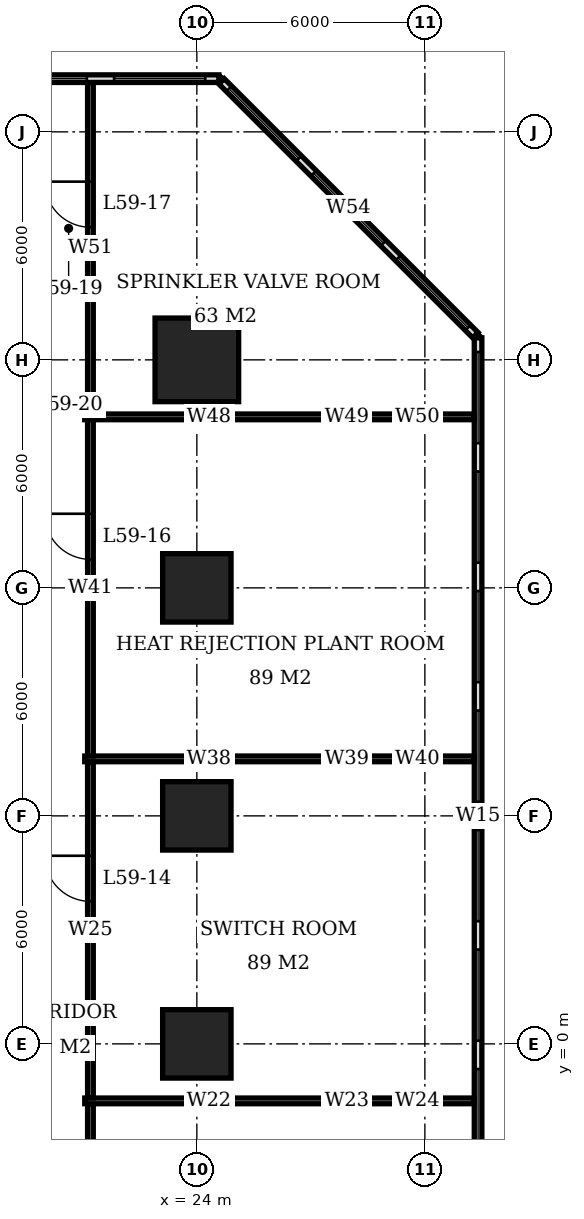
"""IFC4 building model, lengths in metres.
Left out: names, types, materials, properties, quantities, classifications, styles, units other than length and angle.
Written with IfcOpenShell. Run it as: python <this file> out.ifc"""

import sys

from ifc_helpers import new_model, si_unit, direction, frame, frame_2d, origin, origin_2d, place, context, subcontext, project, spatial, rectangle, extrude, element, fill, save


model = new_model("IFC4")
c1 = context("Model", 3, precision=1e-05, world=origin(), true_north=direction((0.0, 1.0)))
c2 = subcontext(c1, "Body", "Model", "MODEL_VIEW")
j1 = project(units=[si_unit("LENGTHUNIT", "METRE"), si_unit("PLANEANGLEUNIT", "RADIAN")], contexts=[c1])
p1 = place(None, origin())
s1 = spatial("IfcSite", under=j1, at=p1, CompositionType="ELEMENT")
p2 = place(p1, origin())
s2 = spatial("IfcBuilding", under=s1, at=p2, CompositionType="ELEMENT")
p3 = place(p2, frame((0.0, 0.0, 239.6)))
s3 = spatial("IfcBuildingStorey", under=s2, at=p3, CompositionType="ELEMENT", Elevation=239.6)
for number, where, z_axis, x_axis in (
    (1, (24.0, 0.0, 0.0), (0.0, 0.0, 1.0), (1.0, 0.0, 0.0)),
    (2, (24.0, 6.0, 0.0), (0.0, 0.0, 1.0), (1.0, 0.0, 0.0)),
    (3, (24.0, 12.0, 0.0), (0.0, 0.0, 1.0), (1.0, 0.0, 0.0)),
):
    element("IfcColumn", number, at=place(p3, frame(where, z_axis=z_axis, x_axis=x_axis)), inside=s3, PredefinedType="COLUMN", context=c2, shape_type="SweptSolid", body=[
        extrude(rectangle(XDim=1.8, YDim=1.8, at=origin_2d()), origin(), (0.0, 0.0, 1.0), 5.4),
    ])
p4 = place(p3, frame((24.0, 18.0, 0.0), z_axis=(0.0, 0.0, 1.0), x_axis=(1.0, 0.0, 0.0)))
e4 = element("IfcColumn", 4, at=p4, inside=s3, PredefinedType="COLUMN", context=c2, shape_type="SweptSolid", body=[
    extrude(rectangle(XDim=2.2, YDim=2.2, at=origin_2d()), origin(), (0.0, 0.0, 1.0), 5.4),
])
p5 = place(p3, frame((31.4, -6.58, 0.0), z_axis=(0.0, 0.0, 1.0), x_axis=(0.0, 1.0, 0.0)))
e5 = element("IfcWall", 5, at=p5, inside=s3, PredefinedType="USERDEFINED", context=c2, shape_type="SweptSolid", body=[
    extrude(rectangle(XDim=25.16, YDim=0.2, at=frame_2d((12.58, 0.0))), origin(), (0.0, 0.0, 1.0), 5.4),
])
p6 = place(p5, frame((0.373, 0.0, 0.6)))
e6 = element("IfcOpeningElement", 6, at=p6, cuts=e5, PredefinedType="OPENING", context=c2, shape_type="SweptSolid", body=[
    extrude(rectangle(XDim=2.4, YDim=3.0, at=frame_2d((1.2, 1.5))), frame((0.0, 0.11, 0.0), z_axis=(0.0, -1.0, 0.0), x_axis=(1.0, 0.0, 0.0)), (0.0, 0.0, 1.0), 0.22),
])
p7 = place(p5, frame((3.518, 0.0, 0.6)))
e7 = element("IfcOpeningElement", 7, at=p7, cuts=e5, PredefinedType="OPENING", context=c2, shape_type="SweptSolid", body=[
    extrude(rectangle(XDim=2.4, YDim=3.0, at=frame_2d((1.2, 1.5))), frame((0.0, 0.11, 0.0), z_axis=(0.0, -1.0, 0.0), x_axis=(1.0, 0.0, 0.0)), (0.0, 0.0, 1.0), 0.22),
])
p8 = place(p5, frame((6.662, 0.0, 0.6)))
e8 = element("IfcOpeningElement", 8, at=p8, cuts=e5, PredefinedType="OPENING", context=c2, shape_type="SweptSolid", body=[
    extrude(rectangle(XDim=2.4, YDim=3.0, at=frame_2d((1.2, 1.5))), frame((0.0, 0.11, 0.0), z_axis=(0.0, -1.0, 0.0), x_axis=(1.0, 0.0, 0.0)), (0.0, 0.0, 1.0), 0.22),
])
p9 = place(p5, frame((9.807, 0.0, 0.6)))
e9 = element("IfcOpeningElement", 9, at=p9, cuts=e5, PredefinedType="OPENING", context=c2, shape_type="SweptSolid", body=[
    extrude(rectangle(XDim=2.4, YDim=3.0, at=frame_2d((1.2, 1.5))), frame((0.0, 0.11, 0.0), z_axis=(0.0, -1.0, 0.0), x_axis=(1.0, 0.0, 0.0)), (0.0, 0.0, 1.0), 0.22),
])
p10 = place(p5, frame((12.952, 0.0, 0.6)))
e10 = element("IfcOpeningElement", 10, at=p10, cuts=e5, PredefinedType="OPENING", context=c2, shape_type="SweptSolid", body=[
    extrude(rectangle(XDim=2.4, YDim=3.0, at=frame_2d((1.2, 1.5))), frame((0.0, 0.11, 0.0), z_axis=(0.0, -1.0, 0.0), x_axis=(1.0, 0.0, 0.0)), (0.0, 0.0, 1.0), 0.22),
])
p11 = place(p5, frame((16.097, 0.0, 0.6)))
e11 = element("IfcOpeningElement", 11, at=p11, cuts=e5, PredefinedType="OPENING", context=c2, shape_type="SweptSolid", body=[
    extrude(rectangle(XDim=2.4, YDim=3.0, at=frame_2d((1.2, 1.5))), frame((0.0, 0.11, 0.0), z_axis=(0.0, -1.0, 0.0), x_axis=(1.0, 0.0, 0.0)), (0.0, 0.0, 1.0), 0.22),
])
p12 = place(p5, frame((19.242, 0.0, 0.6)))
e12 = element("IfcOpeningElement", 12, at=p12, cuts=e5, PredefinedType="OPENING", context=c2, shape_type="SweptSolid", body=[
    extrude(rectangle(XDim=2.4, YDim=3.0, at=frame_2d((1.2, 1.5))), frame((0.0, 0.11, 0.0), z_axis=(0.0, -1.0, 0.0), x_axis=(1.0, 0.0, 0.0)), (0.0, 0.0, 1.0), 0.22),
])
p13 = place(p5, frame((22.387, 0.0, 0.6)))
e13 = element("IfcOpeningElement", 13, at=p13, cuts=e5, PredefinedType="OPENING", context=c2, shape_type="SweptSolid", body=[
    extrude(rectangle(XDim=2.4, YDim=3.0, at=frame_2d((1.2, 1.5))), frame((0.0, 0.11, 0.0), z_axis=(0.0, -1.0, 0.0), x_axis=(1.0, 0.0, 0.0)), (0.0, 0.0, 1.0), 0.22),
])
p14 = place(p3, frame((31.329, 18.651, 0.0), z_axis=(0.0, 0.0, 1.0), x_axis=(-0.707106781187, 0.707106781187, 0.0)))
e14 = element("IfcWall", 14, at=p14, inside=s3, PredefinedType="USERDEFINED", context=c2, shape_type="SweptSolid", body=[
    extrude(rectangle(XDim=9.445, YDim=0.2, at=frame_2d((4.723, 0.0))), origin(), (0.0, 0.0, 1.0), 5.4),
])
p15 = place(p14, frame((0.274, 0.0, 0.6)))
e15 = element("IfcOpeningElement", 15, at=p15, cuts=e14, PredefinedType="OPENING", context=c2, shape_type="SweptSolid", body=[
    extrude(rectangle(XDim=2.6, YDim=3.0, at=frame_2d((1.3, 1.5))), frame((0.0, 0.11, 0.0), z_axis=(0.0, -1.0, 0.0), x_axis=(1.0, 0.0, 0.0)), (0.0, 0.0, 1.0), 0.22),
])
p16 = place(p14, frame((3.423, 0.0, 0.6)))
e16 = element("IfcOpeningElement", 16, at=p16, cuts=e14, PredefinedType="OPENING", context=c2, shape_type="SweptSolid", body=[
    extrude(rectangle(XDim=2.6, YDim=3.0, at=frame_2d((1.3, 1.5))), frame((0.0, 0.11, 0.0), z_axis=(0.0, -1.0, 0.0), x_axis=(1.0, 0.0, 0.0)), (0.0, 0.0, 1.0), 0.22),
])
p17 = place(p14, frame((6.571, 0.0, 0.6)))
e17 = element("IfcOpeningElement", 17, at=p17, cuts=e14, PredefinedType="OPENING", context=c2, shape_type="SweptSolid", body=[
    extrude(rectangle(XDim=2.6, YDim=3.0, at=frame_2d((1.3, 1.5))), frame((0.0, 0.11, 0.0), z_axis=(0.0, -1.0, 0.0), x_axis=(1.0, 0.0, 0.0)), (0.0, 0.0, 1.0), 0.22),
])
p18 = place(p3, frame((24.58, 25.4, 0.0), z_axis=(0.0, 0.0, 1.0), x_axis=(-1.0, 0.0, 0.0)))
e18 = element("IfcWall", 18, at=p18, inside=s3, PredefinedType="USERDEFINED", context=c2, shape_type="SweptSolid", body=[
    extrude(rectangle(XDim=31.16, YDim=0.2, at=frame_2d((15.58, 0.0))), origin(), (0.0, 0.0, 1.0), 5.4),
])
p19 = place(p18, frame((0.358, 0.0, 0.6)))
e19 = element("IfcOpeningElement", 19, at=p19, cuts=e18, PredefinedType="OPENING", context=c2, shape_type="SweptSolid", body=[
    extrude(rectangle(XDim=2.4, YDim=3.0, at=frame_2d((1.2, 1.5))), frame((0.0, 0.11, 0.0), z_axis=(0.0, -1.0, 0.0), x_axis=(1.0, 0.0, 0.0)), (0.0, 0.0, 1.0), 0.22),
])
p20 = place(p18, frame((3.474, 0.0, 0.6)))
e20 = element("IfcOpeningElement", 20, at=p20, cuts=e18, PredefinedType="OPENING", context=c2, shape_type="SweptSolid", body=[
    extrude(rectangle(XDim=2.4, YDim=3.0, at=frame_2d((1.2, 1.5))), frame((0.0, 0.11, 0.0), z_axis=(0.0, -1.0, 0.0), x_axis=(1.0, 0.0, 0.0)), (0.0, 0.0, 1.0), 0.22),
])
p21 = place(p18, frame((6.59, 0.0, 0.6)))
e21 = element("IfcOpeningElement", 21, at=p21, cuts=e18, PredefinedType="OPENING", context=c2, shape_type="SweptSolid", body=[
    extrude(rectangle(XDim=2.4, YDim=3.0, at=frame_2d((1.2, 1.5))), frame((0.0, 0.11, 0.0), z_axis=(0.0, -1.0, 0.0), x_axis=(1.0, 0.0, 0.0)), (0.0, 0.0, 1.0), 0.22),
])
p22 = place(p18, frame((9.706, 0.0, 0.6)))
e22 = element("IfcOpeningElement", 22, at=p22, cuts=e18, PredefinedType="OPENING", context=c2, shape_type="SweptSolid", body=[
    extrude(rectangle(XDim=2.4, YDim=3.0, at=frame_2d((1.2, 1.5))), frame((0.0, 0.11, 0.0), z_axis=(0.0, -1.0, 0.0), x_axis=(1.0, 0.0, 0.0)), (0.0, 0.0, 1.0), 0.22),
])
p23 = place(p18, frame((12.822, 0.0, 0.6)))
e23 = element("IfcOpeningElement", 23, at=p23, cuts=e18, PredefinedType="OPENING", context=c2, shape_type="SweptSolid", body=[
    extrude(rectangle(XDim=2.4, YDim=3.0, at=frame_2d((1.2, 1.5))), frame((0.0, 0.11, 0.0), z_axis=(0.0, -1.0, 0.0), x_axis=(1.0, 0.0, 0.0)), (0.0, 0.0, 1.0), 0.22),
])
p24 = place(p18, frame((15.938, 0.0, 0.6)))
e24 = element("IfcOpeningElement", 24, at=p24, cuts=e18, PredefinedType="OPENING", context=c2, shape_type="SweptSolid", body=[
    extrude(rectangle(XDim=2.4, YDim=3.0, at=frame_2d((1.2, 1.5))), frame((0.0, 0.11, 0.0), z_axis=(0.0, -1.0, 0.0), x_axis=(1.0, 0.0, 0.0)), (0.0, 0.0, 1.0), 0.22),
])
p25 = place(p18, frame((19.054, 0.0, 0.6)))
e25 = element("IfcOpeningElement", 25, at=p25, cuts=e18, PredefinedType="OPENING", context=c2, shape_type="SweptSolid", body=[
    extrude(rectangle(XDim=2.4, YDim=3.0, at=frame_2d((1.2, 1.5))), frame((0.0, 0.11, 0.0), z_axis=(0.0, -1.0, 0.0), x_axis=(1.0, 0.0, 0.0)), (0.0, 0.0, 1.0), 0.22),
])
p26 = place(p18, frame((22.17, 0.0, 0.6)))
e26 = element("IfcOpeningElement", 26, at=p26, cuts=e18, PredefinedType="OPENING", context=c2, shape_type="SweptSolid", body=[
    extrude(rectangle(XDim=2.4, YDim=3.0, at=frame_2d((1.2, 1.5))), frame((0.0, 0.11, 0.0), z_axis=(0.0, -1.0, 0.0), x_axis=(1.0, 0.0, 0.0)), (0.0, 0.0, 1.0), 0.22),
])
p27 = place(p18, frame((25.286, 0.0, 0.6)))
e27 = element("IfcOpeningElement", 27, at=p27, cuts=e18, PredefinedType="OPENING", context=c2, shape_type="SweptSolid", body=[
    extrude(rectangle(XDim=2.4, YDim=3.0, at=frame_2d((1.2, 1.5))), frame((0.0, 0.11, 0.0), z_axis=(0.0, -1.0, 0.0), x_axis=(1.0, 0.0, 0.0)), (0.0, 0.0, 1.0), 0.22),
])
p28 = place(p18, frame((28.402, 0.0, 0.6)))
e28 = element("IfcOpeningElement", 28, at=p28, cuts=e18, PredefinedType="OPENING", context=c2, shape_type="SweptSolid", body=[
    extrude(rectangle(XDim=2.4, YDim=3.0, at=frame_2d((1.2, 1.5))), frame((0.0, 0.11, 0.0), z_axis=(0.0, -1.0, 0.0), x_axis=(1.0, 0.0, 0.0)), (0.0, 0.0, 1.0), 0.22),
])
p29 = place(p3, frame((21.2, -13.3, 0.0), z_axis=(0.0, 0.0, 1.0), x_axis=(0.0, 1.0, 0.0)))
e29 = element("IfcWall", 29, at=p29, inside=s3, PredefinedType="PARTITIONING", context=c2, shape_type="SweptSolid", body=[
    extrude(rectangle(XDim=11.725, YDim=0.15, at=frame_2d((5.863, 0.0))), origin(), (0.0, 0.0, 1.0), 5.15),
])
p30 = place(p29, frame((7.14, 0.0, 0.0)))
e30 = element("IfcOpeningElement", 30, at=p30, cuts=e29, PredefinedType="OPENING", context=c2, shape_type="SweptSolid", body=[
    extrude(rectangle(XDim=1.2, YDim=2.4, at=frame_2d((0.6, 1.2))), frame((0.0, 0.085, 0.0), z_axis=(0.0, -1.0, 0.0), x_axis=(1.0, 0.0, 0.0)), (0.0, 0.0, 1.0), 0.17),
])
p31 = place(p3, frame((21.2, -1.425, 0.0), z_axis=(0.0, 0.0, 1.0), x_axis=(0.0, 1.0, 0.0)))
e31 = element("IfcWall", 31, at=p31, inside=s3, PredefinedType="PARTITIONING", context=c2, shape_type="SweptSolid", body=[
    extrude(rectangle(XDim=8.85, YDim=0.15, at=frame_2d((4.425, 0.0))), origin(), (0.0, 0.0, 1.0), 5.15),
])
p32 = place(p31, frame((5.175, 0.0, 0.0)))
e32 = element("IfcOpeningElement", 32, at=p32, cuts=e31, PredefinedType="OPENING", context=c2, shape_type="SweptSolid", body=[
    extrude(rectangle(XDim=1.2, YDim=2.4, at=frame_2d((0.6, 1.2))), frame((0.0, 0.085, 0.0), z_axis=(0.0, -1.0, 0.0), x_axis=(1.0, 0.0, 0.0)), (0.0, 0.0, 1.0), 0.17),
])
p33 = place(p3, frame((21.05, -1.5, 0.0), z_axis=(0.0, 0.0, 1.0), x_axis=(1.0, 0.0, 0.0)))
e33 = element("IfcWall", 33, at=p33, inside=s3, PredefinedType="PARTITIONING", context=c2, shape_type="SweptSolid", body=[
    extrude(rectangle(XDim=6.54, YDim=0.15, at=frame_2d((3.27, 0.0))), origin(), (0.0, 0.0, 1.0), 5.15),
])
p34 = place(p3, frame((27.59, -1.5, 0.0), z_axis=(0.0, 0.0, 1.0), x_axis=(1.0, 0.0, 0.0)))
e34 = element("IfcWall", 34, at=p34, inside=s3, PredefinedType="PARTITIONING", context=c2, shape_type="SweptSolid", body=[
    extrude(rectangle(XDim=0.72, YDim=0.15, at=frame_2d((0.36, 0.0))), origin(), (0.0, 0.0, 1.0), 4.15),
])
p35 = place(p3, frame((28.31, -1.5, 0.0), z_axis=(0.0, 0.0, 1.0), x_axis=(1.0, 0.0, 0.0)))
e35 = element("IfcWall", 35, at=p35, inside=s3, PredefinedType="PARTITIONING", context=c2, shape_type="SweptSolid", body=[
    extrude(rectangle(XDim=2.99, YDim=0.15, at=frame_2d((1.495, 0.0))), origin(), (0.0, 0.0, 1.0), 5.15),
])
p36 = place(p3, frame((21.2, 7.575, 0.0), z_axis=(0.0, 0.0, 1.0), x_axis=(0.0, 1.0, 0.0)))
e36 = element("IfcWall", 36, at=p36, inside=s3, PredefinedType="PARTITIONING", context=c2, shape_type="SweptSolid", body=[
    extrude(rectangle(XDim=8.85, YDim=0.15, at=frame_2d((4.425, 0.0))), origin(), (0.0, 0.0, 1.0), 5.15),
])
p37 = place(p36, frame((5.175, 0.0, 0.0)))
e37 = element("IfcOpeningElement", 37, at=p37, cuts=e36, PredefinedType="OPENING", context=c2, shape_type="SweptSolid", body=[
    extrude(rectangle(XDim=1.2, YDim=2.4, at=frame_2d((0.6, 1.2))), frame((0.0, 0.085, 0.0), z_axis=(0.0, -1.0, 0.0), x_axis=(1.0, 0.0, 0.0)), (0.0, 0.0, 1.0), 0.17),
])
p38 = place(p3, frame((21.05, 7.5, 0.0), z_axis=(0.0, 0.0, 1.0), x_axis=(1.0, 0.0, 0.0)))
e38 = element("IfcWall", 38, at=p38, inside=s3, PredefinedType="PARTITIONING", context=c2, shape_type="SweptSolid", body=[
    extrude(rectangle(XDim=6.54, YDim=0.15, at=frame_2d((3.27, 0.0))), origin(), (0.0, 0.0, 1.0), 5.15),
])
p39 = place(p3, frame((27.59, 7.5, 0.0), z_axis=(0.0, 0.0, 1.0), x_axis=(1.0, 0.0, 0.0)))
e39 = element("IfcWall", 39, at=p39, inside=s3, PredefinedType="PARTITIONING", context=c2, shape_type="SweptSolid", body=[
    extrude(rectangle(XDim=0.72, YDim=0.15, at=frame_2d((0.36, 0.0))), origin(), (0.0, 0.0, 1.0), 4.15),
])
p40 = place(p3, frame((28.31, 7.5, 0.0), z_axis=(0.0, 0.0, 1.0), x_axis=(1.0, 0.0, 0.0)))
e40 = element("IfcWall", 40, at=p40, inside=s3, PredefinedType="PARTITIONING", context=c2, shape_type="SweptSolid", body=[
    extrude(rectangle(XDim=2.99, YDim=0.15, at=frame_2d((1.495, 0.0))), origin(), (0.0, 0.0, 1.0), 5.15),
])
p41 = place(p3, frame((21.2, 16.575, 0.0), z_axis=(0.0, 0.0, 1.0), x_axis=(0.0, 1.0, 0.0)))
e41 = element("IfcWall", 41, at=p41, inside=s3, PredefinedType="PARTITIONING", context=c2, shape_type="SweptSolid", body=[
    extrude(rectangle(XDim=8.725, YDim=0.15, at=frame_2d((4.363, 0.0))), origin(), (0.0, 0.0, 1.0), 5.15),
])
p42 = place(p41, frame((4.915, 0.0, 0.0)))
e42 = element("IfcOpeningElement", 42, at=p42, cuts=e41, PredefinedType="OPENING", context=c2, shape_type="SweptSolid", body=[
    extrude(rectangle(XDim=1.2, YDim=2.4, at=frame_2d((0.6, 1.2))), frame((0.0, 0.085, 0.0), z_axis=(0.0, -1.0, 0.0), x_axis=(1.0, 0.0, 0.0)), (0.0, 0.0, 1.0), 0.17),
])
p43 = place(p3, frame((21.05, 16.5, 0.0), z_axis=(0.0, 0.0, 1.0), x_axis=(1.0, 0.0, 0.0)))
e43 = element("IfcWall", 43, at=p43, inside=s3, PredefinedType="PARTITIONING", context=c2, shape_type="SweptSolid", body=[
    extrude(rectangle(XDim=6.54, YDim=0.15, at=frame_2d((3.27, 0.0))), origin(), (0.0, 0.0, 1.0), 5.15),
])
p44 = place(p3, frame((27.59, 16.5, 0.0), z_axis=(0.0, 0.0, 1.0), x_axis=(1.0, 0.0, 0.0)))
e44 = element("IfcWall", 44, at=p44, inside=s3, PredefinedType="PARTITIONING", context=c2, shape_type="SweptSolid", body=[
    extrude(rectangle(XDim=0.72, YDim=0.15, at=frame_2d((0.36, 0.0))), origin(), (0.0, 0.0, 1.0), 4.15),
])
p45 = place(p3, frame((28.31, 16.5, 0.0), z_axis=(0.0, 0.0, 1.0), x_axis=(1.0, 0.0, 0.0)))
e45 = element("IfcWall", 45, at=p45, inside=s3, PredefinedType="PARTITIONING", context=c2, shape_type="SweptSolid", body=[
    extrude(rectangle(XDim=2.99, YDim=0.15, at=frame_2d((1.495, 0.0))), origin(), (0.0, 0.0, 1.0), 5.15),
])
p46 = place(p7, origin())
e46 = element("IfcWindow", 46, at=p46, inside=s3, PartitioningType="SINGLE_PANEL", PredefinedType="USERDEFINED", context=c2, shape_type="SweptSolid", body=[
    extrude(rectangle(XDim=2.4, YDim=3.0, at=frame_2d((1.2, 1.5))), frame((0.0, 0.03, 0.0), z_axis=(0.0, -1.0, 0.0), x_axis=(1.0, 0.0, 0.0)), (0.0, 0.0, 1.0), 0.06),
])
fill(e7, e46)
p47 = place(p8, origin())
e47 = element("IfcWindow", 47, at=p47, inside=s3, PartitioningType="SINGLE_PANEL", PredefinedType="USERDEFINED", context=c2, shape_type="SweptSolid", body=[
    extrude(rectangle(XDim=2.4, YDim=3.0, at=frame_2d((1.2, 1.5))), frame((0.0, 0.03, 0.0), z_axis=(0.0, -1.0, 0.0), x_axis=(1.0, 0.0, 0.0)), (0.0, 0.0, 1.0), 0.06),
])
fill(e8, e47)
p48 = place(p9, origin())
e48 = element("IfcWindow", 48, at=p48, inside=s3, PartitioningType="SINGLE_PANEL", PredefinedType="USERDEFINED", context=c2, shape_type="SweptSolid", body=[
    extrude(rectangle(XDim=2.4, YDim=3.0, at=frame_2d((1.2, 1.5))), frame((0.0, 0.03, 0.0), z_axis=(0.0, -1.0, 0.0), x_axis=(1.0, 0.0, 0.0)), (0.0, 0.0, 1.0), 0.06),
])
fill(e9, e48)
p49 = place(p10, origin())
e49 = element("IfcWindow", 49, at=p49, inside=s3, PartitioningType="SINGLE_PANEL", PredefinedType="USERDEFINED", context=c2, shape_type="SweptSolid", body=[
    extrude(rectangle(XDim=2.4, YDim=3.0, at=frame_2d((1.2, 1.5))), frame((0.0, 0.03, 0.0), z_axis=(0.0, -1.0, 0.0), x_axis=(1.0, 0.0, 0.0)), (0.0, 0.0, 1.0), 0.06),
])
fill(e10, e49)
p50 = place(p11, origin())
e50 = element("IfcWindow", 50, at=p50, inside=s3, PartitioningType="SINGLE_PANEL", PredefinedType="USERDEFINED", context=c2, shape_type="SweptSolid", body=[
    extrude(rectangle(XDim=2.4, YDim=3.0, at=frame_2d((1.2, 1.5))), frame((0.0, 0.03, 0.0), z_axis=(0.0, -1.0, 0.0), x_axis=(1.0, 0.0, 0.0)), (0.0, 0.0, 1.0), 0.06),
])
fill(e11, e50)
p51 = place(p12, origin())
e51 = element("IfcWindow", 51, at=p51, inside=s3, PartitioningType="SINGLE_PANEL", PredefinedType="USERDEFINED", context=c2, shape_type="SweptSolid", body=[
    extrude(rectangle(XDim=2.4, YDim=3.0, at=frame_2d((1.2, 1.5))), frame((0.0, 0.03, 0.0), z_axis=(0.0, -1.0, 0.0), x_axis=(1.0, 0.0, 0.0)), (0.0, 0.0, 1.0), 0.06),
])
fill(e12, e51)
p52 = place(p13, origin())
e52 = element("IfcWindow", 52, at=p52, inside=s3, PartitioningType="SINGLE_PANEL", PredefinedType="USERDEFINED", context=c2, shape_type="SweptSolid", body=[
    extrude(rectangle(XDim=2.4, YDim=3.0, at=frame_2d((1.2, 1.5))), frame((0.0, 0.03, 0.0), z_axis=(0.0, -1.0, 0.0), x_axis=(1.0, 0.0, 0.0)), (0.0, 0.0, 1.0), 0.06),
])
fill(e13, e52)
p53 = place(p15, origin())
e53 = element("IfcWindow", 53, at=p53, inside=s3, PartitioningType="SINGLE_PANEL", PredefinedType="USERDEFINED", context=c2, shape_type="SweptSolid", body=[
    extrude(rectangle(XDim=2.6, YDim=3.0, at=frame_2d((1.3, 1.5))), frame((0.0, 0.03, 0.0), z_axis=(0.0, -1.0, 0.0), x_axis=(1.0, 0.0, 0.0)), (0.0, 0.0, 1.0), 0.06),
])
fill(e15, e53)
p54 = place(p16, origin())
e54 = element("IfcWindow", 54, at=p54, inside=s3, PartitioningType="SINGLE_PANEL", PredefinedType="USERDEFINED", context=c2, shape_type="SweptSolid", body=[
    extrude(rectangle(XDim=2.6, YDim=3.0, at=frame_2d((1.3, 1.5))), frame((0.0, 0.03, 0.0), z_axis=(0.0, -1.0, 0.0), x_axis=(1.0, 0.0, 0.0)), (0.0, 0.0, 1.0), 0.06),
])
fill(e16, e54)
p55 = place(p17, origin())
e55 = element("IfcWindow", 55, at=p55, inside=s3, PartitioningType="SINGLE_PANEL", PredefinedType="USERDEFINED", context=c2, shape_type="SweptSolid", body=[
    extrude(rectangle(XDim=2.6, YDim=3.0, at=frame_2d((1.3, 1.5))), frame((0.0, 0.03, 0.0), z_axis=(0.0, -1.0, 0.0), x_axis=(1.0, 0.0, 0.0)), (0.0, 0.0, 1.0), 0.06),
])
fill(e17, e55)
p56 = place(p19, origin())
e56 = element("IfcWindow", 56, at=p56, inside=s3, PartitioningType="SINGLE_PANEL", PredefinedType="USERDEFINED", context=c2, shape_type="SweptSolid", body=[
    extrude(rectangle(XDim=2.4, YDim=3.0, at=frame_2d((1.2, 1.5))), frame((0.0, 0.03, 0.0), z_axis=(0.0, -1.0, 0.0), x_axis=(1.0, 0.0, 0.0)), (0.0, 0.0, 1.0), 0.06),
])
fill(e19, e56)
p57 = place(p20, origin())
e57 = element("IfcWindow", 57, at=p57, inside=s3, PartitioningType="SINGLE_PANEL", PredefinedType="USERDEFINED", context=c2, shape_type="SweptSolid", body=[
    extrude(rectangle(XDim=2.4, YDim=3.0, at=frame_2d((1.2, 1.5))), frame((0.0, 0.03, 0.0), z_axis=(0.0, -1.0, 0.0), x_axis=(1.0, 0.0, 0.0)), (0.0, 0.0, 1.0), 0.06),
])
fill(e20, e57)
p58 = place(p32, origin())
e58 = element("IfcDoor", 58, at=p58, inside=s3, OperationType="SINGLE_SWING_RIGHT", PredefinedType="DOOR", context=c2, shape_type="SweptSolid", body=[
    extrude(rectangle(XDim=1.2, YDim=2.4, at=frame_2d((0.6, 1.2))), frame((0.0, 0.025, 0.0), z_axis=(0.0, -1.0, 0.0), x_axis=(1.0, 0.0, 0.0)), (0.0, 0.0, 1.0), 0.05),
])
fill(e32, e58)
p59 = place(p37, origin())
e59 = element("IfcDoor", 59, at=p59, inside=s3, OperationType="SINGLE_SWING_RIGHT", PredefinedType="DOOR", context=c2, shape_type="SweptSolid", body=[
    extrude(rectangle(XDim=1.2, YDim=2.4, at=frame_2d((0.6, 1.2))), frame((0.0, 0.025, 0.0), z_axis=(0.0, -1.0, 0.0), x_axis=(1.0, 0.0, 0.0)), (0.0, 0.0, 1.0), 0.05),
])
fill(e37, e59)
p60 = place(p42, origin())
e60 = element("IfcDoor", 60, at=p60, inside=s3, OperationType="SINGLE_SWING_RIGHT", PredefinedType="DOOR", context=c2, shape_type="SweptSolid", body=[
    extrude(rectangle(XDim=1.2, YDim=2.4, at=frame_2d((0.6, 1.2))), frame((0.0, 0.025, 0.0), z_axis=(0.0, -1.0, 0.0), x_axis=(1.0, 0.0, 0.0)), (0.0, 0.0, 1.0), 0.05),
])
fill(e42, e60)
save(model, sys.argv[1])
